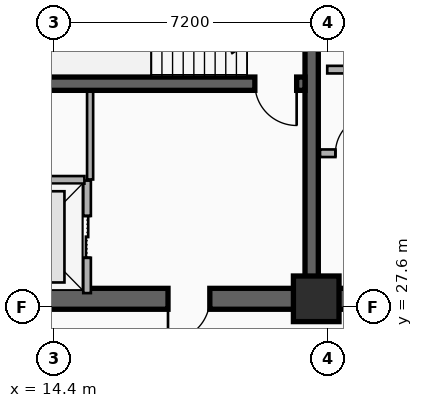
"""IFC4 building model, lengths in metres.
Left out: names, types, materials, properties, quantities, classifications, styles, units other than length and angle.
Written with IfcOpenShell. Run it as: python <this file> out.ifc"""

import sys

from ifc_helpers import new_model, si_unit, direction, frame, frame_2d, origin, origin_2d, place, context, subcontext, project, spatial, rectangle, extrude, element, fill, save


model = new_model("IFC4")
c1 = context("Model", 3, precision=1e-05, world=origin(), true_north=direction((0.0, 1.0)))
c2 = subcontext(c1, "Body", "Model", "MODEL_VIEW")
j1 = project(units=[si_unit("LENGTHUNIT", "METRE"), si_unit("PLANEANGLEUNIT", "RADIAN")], contexts=[c1])
p1 = place(None, origin())
s1 = spatial("IfcSite", under=j1, at=p1, CompositionType="ELEMENT")
p2 = place(p1, origin())
s2 = spatial("IfcBuilding", under=s1, at=p2, CompositionType="ELEMENT")
p3 = place(p2, frame((0.0, 0.0, 162.55)))
s3 = spatial("IfcBuildingStorey", under=s2, at=p3, CompositionType="ELEMENT", Elevation=162.55)
p4 = place(p3, frame((21.18, 27.82, 0.0), z_axis=(0.0, 0.0, 1.0), x_axis=(-1.0, 0.0, 0.0)))
e1 = element("IfcWall", 1, at=p4, inside=s3, PredefinedType="SHEAR", context=c2, shape_type="SweptSolid", body=[
    extrude(rectangle(XDim=9.03, YDim=0.55, at=frame_2d((4.515, 0.0))), origin(), (0.0, 0.0, 1.0), 3.55),
])
p5 = place(p4, frame((2.68, 0.0, 0.0)))
e2 = element("IfcOpeningElement", 2, at=p5, cuts=e1, PredefinedType="OPENING", context=c2, shape_type="SweptSolid", body=[
    extrude(rectangle(XDim=1.1, YDim=2.15, at=frame_2d((0.55, 1.075))), frame((0.0, 0.285, 0.0), z_axis=(0.0, -1.0, 0.0), x_axis=(1.0, 0.0, 0.0)), (0.0, 0.0, 1.0), 0.57),
])
p6 = place(p3, frame((33.15, 27.82, 0.0), z_axis=(0.0, 0.0, 1.0), x_axis=(-1.0, 0.0, 0.0)))
e3 = element("IfcWall", 3, at=p6, inside=s3, PredefinedType="SHEAR", context=c2, shape_type="SweptSolid", body=[
    extrude(rectangle(XDim=11.97, YDim=0.55, at=frame_2d((5.985, 0.0))), origin(), (0.0, 0.0, 1.0), 3.55),
])
p7 = place(p6, frame((6.1, 0.0, 0.0)))
e4 = element("IfcOpeningElement", 4, at=p7, cuts=e3, PredefinedType="OPENING", context=c2, shape_type="SweptSolid", body=[
    extrude(rectangle(XDim=1.6, YDim=2.2, at=frame_2d((0.8, 1.1))), frame((0.0, 0.285, 0.0), z_axis=(0.0, -1.0, 0.0), x_axis=(1.0, 0.0, 0.0)), (0.0, 0.0, 1.0), 0.57),
])
p8 = place(p3, frame((21.18, 28.095, 0.0), z_axis=(0.0, 0.0, 1.0), x_axis=(0.0, 1.0, 0.0)))
e5 = element("IfcWall", 5, at=p8, inside=s3, PredefinedType="SHEAR", context=c2, shape_type="SweptSolid", body=[
    extrude(rectangle(XDim=8.68, YDim=0.35, at=frame_2d((4.34, 0.0))), origin(), (0.0, 0.0, 1.0), 3.55),
])
p9 = place(p3, frame((21.005, 33.48, 0.0), z_axis=(0.0, 0.0, 1.0), x_axis=(-1.0, 0.0, 0.0)))
e6 = element("IfcWall", 6, at=p9, inside=s3, PredefinedType="SHEAR", context=c2, shape_type="SweptSolid", body=[
    extrude(rectangle(XDim=8.58, YDim=0.35, at=frame_2d((4.29, 0.0))), origin(), (0.0, 0.0, 1.0), 3.55),
])
p10 = place(p9, frame((0.22, 0.0, 0.0)))
e7 = element("IfcOpeningElement", 7, at=p10, cuts=e6, PredefinedType="OPENING", context=c2, shape_type="SweptSolid", body=[
    extrude(rectangle(XDim=1.1, YDim=2.15, at=frame_2d((0.55, 1.075))), frame((0.0, 0.185, 0.0), z_axis=(0.0, -1.0, 0.0), x_axis=(1.0, 0.0, 0.0)), (0.0, 0.0, 1.0), 0.37),
])
p11 = place(p3, frame((21.3, 27.82, 0.0), z_axis=(0.0, 0.0, 1.0), x_axis=(1.0, 0.0, 0.0)))
e8 = element("IfcColumn", 8, at=p11, inside=s3, PredefinedType="COLUMN", context=c2, shape_type="SweptSolid", body=[
    extrude(rectangle(XDim=1.2, YDim=1.2, at=origin_2d()), origin(), (0.0, 0.0, 1.0), 3.55),
])
p12 = place(p3, frame((15.27, 27.97, 0.0), z_axis=(0.0, 0.0, 1.0), x_axis=(0.0, 1.0, 0.0)))
e9 = element("IfcWall", 9, at=p12, inside=s3, PredefinedType="PARTITIONING", context=c2, shape_type="SweptSolid", body=[
    extrude(rectangle(XDim=2.96, YDim=0.2, at=frame_2d((1.48, 0.0))), origin(), (0.0, 0.0, 1.0), 2.36),
])
p13 = place(p12, frame((0.93, 0.0, 0.0)))
e10 = element("IfcOpeningElement", 10, at=p13, cuts=e9, PredefinedType="OPENING", context=c2, shape_type="SweptSolid", body=[
    extrude(rectangle(XDim=1.1, YDim=2.15, at=frame_2d((0.55, 1.075))), frame((0.0, 0.11, 0.0), z_axis=(0.0, -1.0, 0.0), x_axis=(1.0, 0.0, 0.0)), (0.0, 0.0, 1.0), 0.22),
])
p14 = place(p3, frame((12.45, 30.95, 0.0), z_axis=(0.0, 0.0, 1.0), x_axis=(1.0, 0.0, 0.0)))
e11 = element("IfcWall", 11, at=p14, inside=s3, PredefinedType="PARTITIONING", context=c2, shape_type="SweptSolid", body=[
    extrude(rectangle(XDim=2.75, YDim=0.2, at=frame_2d((1.375, 0.0))), origin(), (0.0, 0.0, 1.0), 2.36),
])
p15 = place(p3, frame((21.4, 31.65, 0.0), z_axis=(0.0, 0.0, 1.0), x_axis=(1.0, 0.0, 0.0)))
e12 = element("IfcWall", 12, at=p15, inside=s3, PredefinedType="PARTITIONING", context=c2, shape_type="SweptSolid", body=[
    extrude(rectangle(XDim=1.81, YDim=0.2, at=frame_2d((0.905, 0.0))), origin(), (0.0, 0.0, 1.0), 2.36),
])
p16 = place(p15, frame((0.405, 0.0, 0.0)))
e13 = element("IfcOpeningElement", 13, at=p16, cuts=e12, PredefinedType="OPENING", context=c2, shape_type="SweptSolid", body=[
    extrude(rectangle(XDim=1.0, YDim=2.15, at=frame_2d((0.5, 1.075))), frame((0.0, 0.11, 0.0), z_axis=(0.0, -1.0, 0.0), x_axis=(1.0, 0.0, 0.0)), (0.0, 0.0, 1.0), 0.22),
])
p17 = place(p3, frame((21.59, 33.85, 0.0), z_axis=(0.0, 0.0, 1.0), x_axis=(1.0, 0.0, 0.0)))
e14 = element("IfcWall", 14, at=p17, inside=s3, PredefinedType="PARTITIONING", context=c2, shape_type="SweptSolid", body=[
    extrude(rectangle(XDim=5.92, YDim=0.2, at=frame_2d((2.96, 0.0))), origin(), (0.0, 0.0, 1.0), 2.36),
])
p18 = place(p17, frame((2.36, 0.0, 0.0)))
e15 = element("IfcOpeningElement", 15, at=p18, cuts=e14, PredefinedType="OPENING", context=c2, shape_type="SweptSolid", body=[
    extrude(rectangle(XDim=1.2, YDim=2.15, at=frame_2d((0.6, 1.075))), frame((0.0, 0.11, 0.0), z_axis=(0.0, -1.0, 0.0), x_axis=(1.0, 0.0, 0.0)), (0.0, 0.0, 1.0), 0.22),
])
p19 = place(p3, frame((15.35, 30.96, 0.0), z_axis=(0.0, 0.0, 1.0), x_axis=(0.0, 1.0, 0.0)))
e16 = element("IfcWall", 16, at=p19, inside=s3, PredefinedType="PARTITIONING", context=c2, shape_type="SweptSolid", body=[
    extrude(rectangle(XDim=2.31, YDim=0.16, at=frame_2d((1.155, 0.0))), origin(), (0.0, 0.0, 1.0), 3.29),
])
p20 = place(p13, origin())
e17 = element("IfcDoor", 17, at=p20, inside=s3, OperationType="DOUBLE_DOOR_SLIDING", PredefinedType="DOOR", context=c2, shape_type="SweptSolid", body=[
    extrude(rectangle(XDim=1.1, YDim=2.15, at=frame_2d((0.55, 1.075))), frame((0.0, 0.025, 0.0), z_axis=(0.0, -1.0, 0.0), x_axis=(1.0, 0.0, 0.0)), (0.0, 0.0, 1.0), 0.05),
])
fill(e10, e17)
p21 = place(p10, origin())
e18 = element("IfcDoor", 18, at=p21, inside=s3, OperationType="SINGLE_SWING_LEFT", PredefinedType="DOOR", context=c2, shape_type="SweptSolid", body=[
    extrude(rectangle(XDim=1.1, YDim=2.15, at=frame_2d((0.55, 1.075))), frame((0.0, 0.025, 0.0), z_axis=(0.0, -1.0, 0.0), x_axis=(1.0, 0.0, 0.0)), (0.0, 0.0, 1.0), 0.05),
])
fill(e7, e18)
p22 = place(p5, origin())
e19 = element("IfcDoor", 19, at=p22, inside=s3, OperationType="SINGLE_SWING_RIGHT", PredefinedType="DOOR", context=c2, shape_type="SweptSolid", body=[
    extrude(rectangle(XDim=1.1, YDim=2.15, at=frame_2d((0.55, 1.075))), frame((0.0, 0.025, 0.0), z_axis=(0.0, -1.0, 0.0), x_axis=(1.0, 0.0, 0.0)), (0.0, 0.0, 1.0), 0.05),
])
fill(e2, e19)
p23 = place(p16, origin())
e20 = element("IfcDoor", 20, at=p23, inside=s3, OperationType="SINGLE_SWING_RIGHT", PredefinedType="DOOR", context=c2, shape_type="SweptSolid", body=[
    extrude(rectangle(XDim=1.0, YDim=2.15, at=frame_2d((0.5, 1.075))), frame((0.0, 0.025, 0.0), z_axis=(0.0, -1.0, 0.0), x_axis=(1.0, 0.0, 0.0)), (0.0, 0.0, 1.0), 0.05),
])
fill(e13, e20)
save(model, sys.argv[1])
